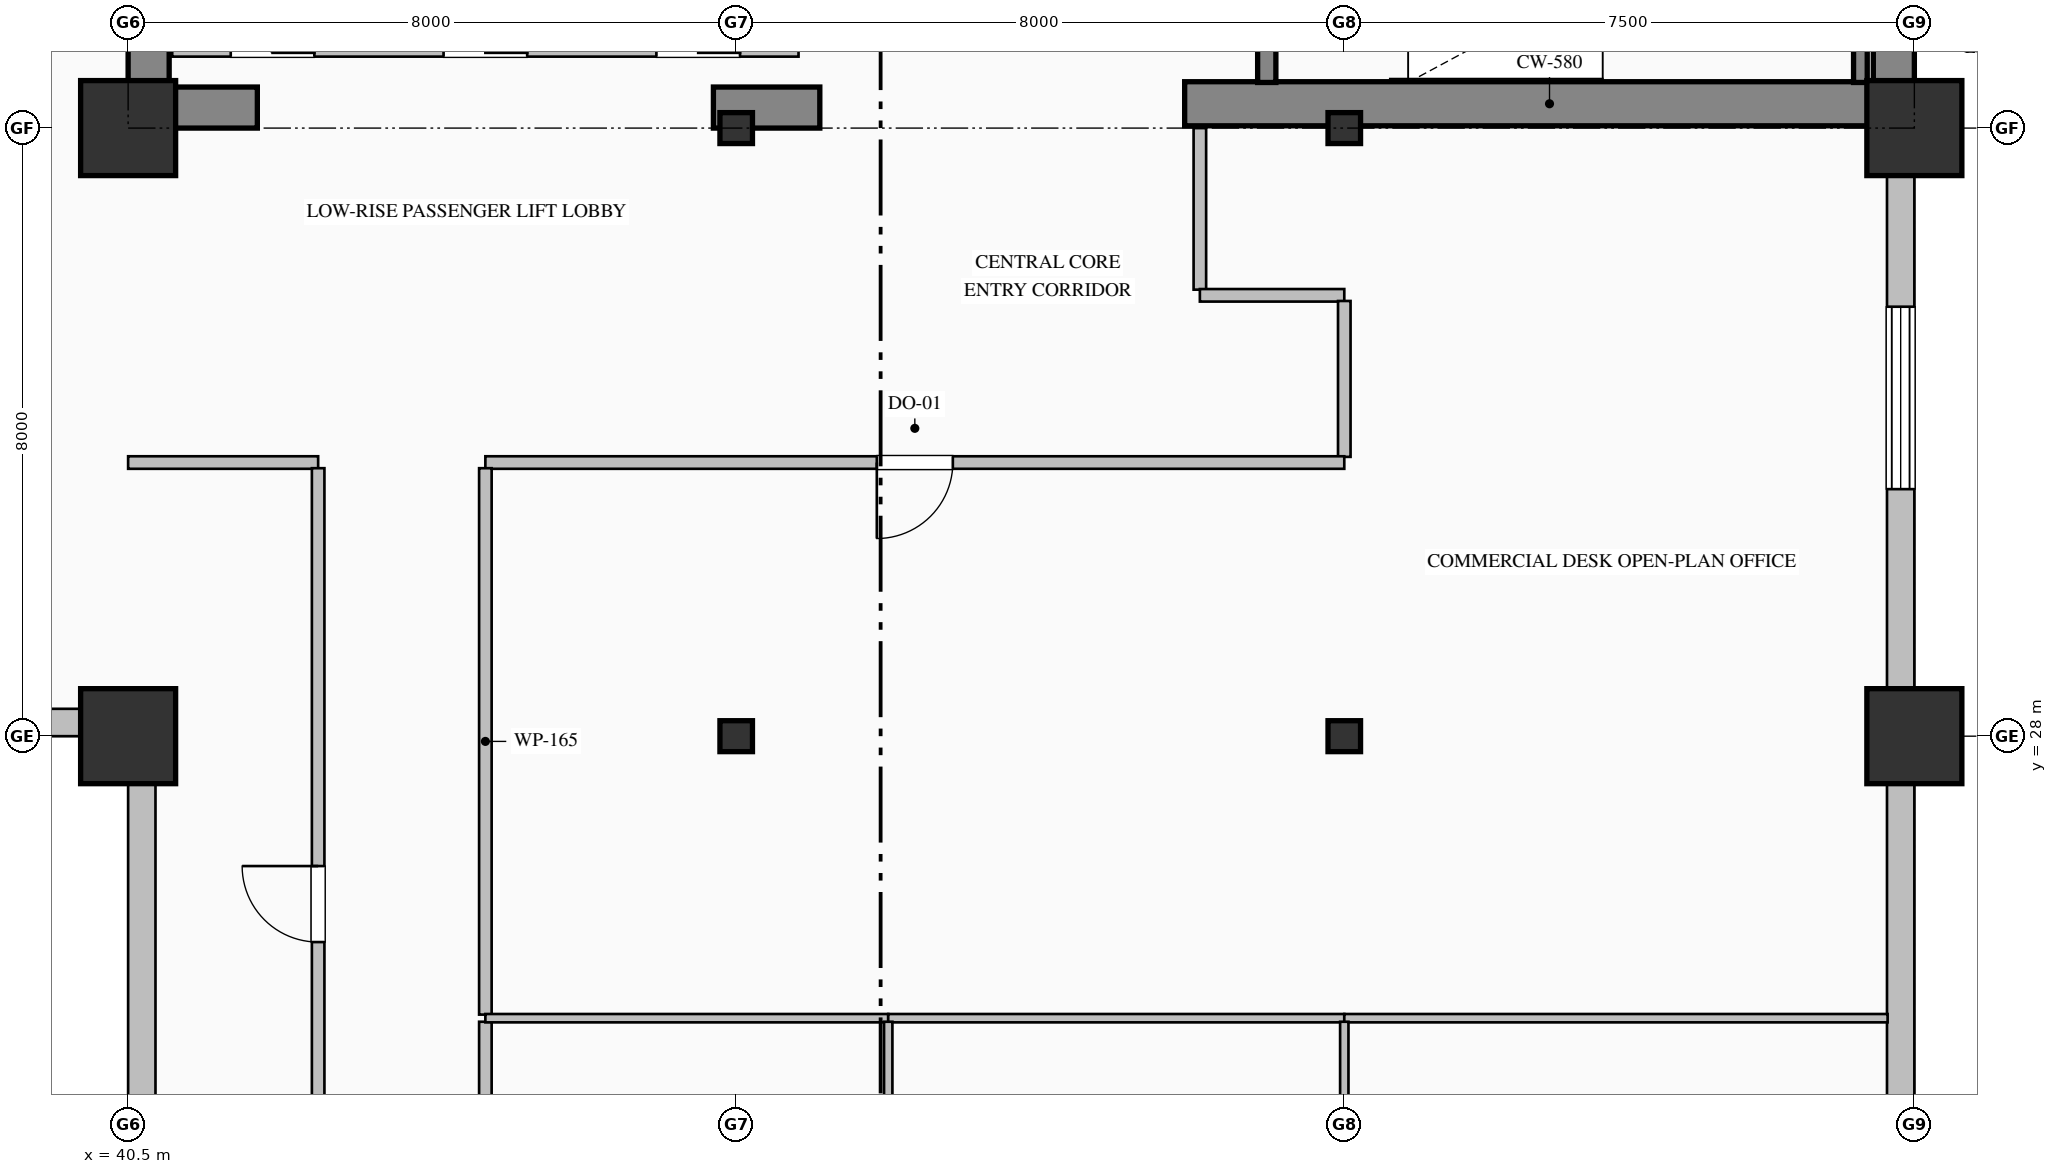
"""IFC4 building model, lengths in metres.
Left out: names, types, materials, properties, quantities, classifications, styles, units other than length and angle.
Written with IfcOpenShell. Run it as: python <this file> out.ifc"""

import sys

from ifc_helpers import new_model, si_unit, direction, frame, frame_2d, origin, origin_2d, place, context, subcontext, project, spatial, rectangle, hollow_rectangle, i_section, extrude, element, fill, save


model = new_model("IFC4")
c1 = context("Model", 3, precision=1e-05, world=origin(), true_north=direction((0.0, 1.0)))
c2 = subcontext(c1, "Body", "Model", "MODEL_VIEW")
j1 = project(units=[si_unit("LENGTHUNIT", "METRE"), si_unit("PLANEANGLEUNIT", "RADIAN")], contexts=[c1])
p1 = place(None, origin())
s1 = spatial("IfcSite", under=j1, at=p1, CompositionType="ELEMENT")
p2 = place(p1, origin())
s2 = spatial("IfcBuilding", under=s1, at=p2, CompositionType="ELEMENT")
p3 = place(p2, frame((0.0, 0.0, 96.2)))
s3 = spatial("IfcBuildingStorey", under=s2, at=p3, CompositionType="ELEMENT", Elevation=96.2)
p4 = place(p3, frame((63.73, 36.32, 0.0), z_axis=(0.0, 0.0, 1.0), x_axis=(0.0, 1.0, 0.0)))
e1 = element("IfcWall", 1, at=p4, inside=s3, PredefinedType="SHEAR", context=c2, shape_type="SweptSolid", body=[
    extrude(rectangle(XDim=15.14, YDim=0.54, at=frame_2d((7.57, 0.0))), origin(), (0.0, 0.0, 1.0), 3.75),
])
p5 = place(p3, frame((40.77, 36.54, 0.0), z_axis=(0.0, 0.0, 1.0), x_axis=(0.0, 1.0, 0.0)))
e2 = element("IfcWall", 2, at=p5, inside=s3, PredefinedType="SHEAR", context=c2, shape_type="SweptSolid", body=[
    extrude(rectangle(XDim=7.86, YDim=0.54, at=frame_2d((3.93, 0.0))), origin(), (0.0, 0.0, 1.0), 3.75),
])
p6 = place(p3, frame((40.5, 36.27, 0.0), z_axis=(0.0, 0.0, 1.0), x_axis=(1.0, 0.0, 0.0)))
e3 = element("IfcWall", 3, at=p6, inside=s3, PredefinedType="SHEAR", context=c2, shape_type="SweptSolid", body=[
    extrude(rectangle(XDim=1.7, YDim=0.54, at=frame_2d((0.85, 0.0))), origin(), (0.0, 0.0, 1.0), 3.75),
])
p7 = place(p3, frame((48.2, 36.27, 0.0), z_axis=(0.0, 0.0, 1.0), x_axis=(1.0, 0.0, 0.0)))
e4 = element("IfcWall", 4, at=p7, inside=s3, PredefinedType="SHEAR", context=c2, shape_type="SweptSolid", body=[
    extrude(rectangle(XDim=1.4, YDim=0.54, at=frame_2d((0.7, 0.0))), origin(), (0.0, 0.0, 1.0), 3.75),
])
p8 = place(p3, frame((54.4, 36.32, 0.0), z_axis=(0.0, 0.0, 1.0), x_axis=(1.0, 0.0, 0.0)))
e5 = element("IfcWall", 5, at=p8, inside=s3, PredefinedType="SHEAR", context=c2, shape_type="SweptSolid", body=[
    extrude(rectangle(XDim=9.6, YDim=0.58, at=frame_2d((4.8, 0.0))), origin(), (0.0, 0.0, 1.0), 4.0),
])
for number, where, z_axis, x_axis in (
    (6, (40.5, 28.0, 0.0), (0.0, 0.0, 1.0), (1.0, 0.0, 0.0)),
    (7, (40.5, 36.0, 0.0), (0.0, 0.0, 1.0), (1.0, 0.0, 0.0)),
):
    element("IfcColumn", number, at=place(p3, frame(where, z_axis=z_axis, x_axis=x_axis)), inside=s3, PredefinedType="COLUMN", context=c2, shape_type="SweptSolid", body=[
        extrude(hollow_rectangle(XDim=1.25, YDim=1.25, WallThickness=0.045, at=origin_2d()), origin(), (0.0, 0.0, 1.0), 4.0),
    ])
for number, where, z_axis, x_axis in (
    (8, (48.5, 28.0, 0.0), (0.0, 0.0, 1.0), (1.0, 0.0, 0.0)),
    (9, (48.5, 36.0, 0.0), (0.0, 0.0, 1.0), (1.0, 0.0, 0.0)),
    (10, (56.5, 28.0, 0.0), (0.0, 0.0, 1.0), (1.0, 0.0, 0.0)),
    (11, (56.5, 36.0, 0.0), (0.0, 0.0, 1.0), (1.0, 0.0, 0.0)),
):
    element("IfcColumn", number, at=place(p3, frame(where, z_axis=z_axis, x_axis=x_axis)), inside=s3, PredefinedType="COLUMN", context=c2, shape_type="SweptSolid", body=[
        extrude(i_section(OverallWidth=0.407, OverallDepth=0.428, WebThickness=0.02, FlangeThickness=0.035, FilletRadius=0.022, at=origin_2d()), origin(), (0.0, 0.0, 1.0), 4.0),
    ])
for number, where, z_axis, x_axis in (
    (12, (64.0, 28.0, 0.0), (0.0, 0.0, 1.0), (1.0, 0.0, 0.0)),
    (13, (64.0, 36.0, 0.0), (0.0, 0.0, 1.0), (1.0, 0.0, 0.0)),
):
    element("IfcColumn", number, at=place(p3, frame(where, z_axis=z_axis, x_axis=x_axis)), inside=s3, PredefinedType="COLUMN", context=c2, shape_type="SweptSolid", body=[
        extrude(hollow_rectangle(XDim=1.25, YDim=1.25, WallThickness=0.045, at=origin_2d()), origin(), (0.0, 0.0, 1.0), 4.0),
    ])
p9 = place(p3, frame((40.68, 8.0, 0.0), z_axis=(0.0, 0.0, 1.0), x_axis=(0.0, 1.0, 0.0)))
e14 = element("IfcWall", 14, at=p9, inside=s3, PredefinedType="SOLIDWALL", context=c2, shape_type="SweptSolid", body=[
    extrude(rectangle(XDim=20.36, YDim=0.36, at=frame_2d((10.18, 0.0))), origin(), (0.0, 0.0, 1.0), 3.05),
])
p10 = place(p9, frame((6.6, 0.0, 0.7)))
e15 = element("IfcOpeningElement", 15, at=p10, cuts=e14, PredefinedType="OPENING", context=c2, shape_type="SweptSolid", body=[
    extrude(rectangle(XDim=1.2, YDim=1.85, at=frame_2d((0.6, 0.925))), frame((0.0, 0.19, 0.0), z_axis=(0.0, -1.0, 0.0), x_axis=(1.0, 0.0, 0.0)), (0.0, 0.0, 1.0), 0.38),
])
p11 = place(p9, frame((13.8, 0.0, 0.7)))
e16 = element("IfcOpeningElement", 16, at=p11, cuts=e14, PredefinedType="OPENING", context=c2, shape_type="SweptSolid", body=[
    extrude(rectangle(XDim=1.2, YDim=1.85, at=frame_2d((0.6, 0.925))), frame((0.0, 0.19, 0.0), z_axis=(0.0, -1.0, 0.0), x_axis=(1.0, 0.0, 0.0)), (0.0, 0.0, 1.0), 0.38),
])
p12 = place(p3, frame((40.52, 28.18, 0.0), z_axis=(0.0, 0.0, 1.0), x_axis=(-1.0, 0.0, 0.0)))
e17 = element("IfcWall", 17, at=p12, inside=s3, PredefinedType="SOLIDWALL", context=c2, shape_type="SweptSolid", body=[
    extrude(rectangle(XDim=36.52, YDim=0.36, at=frame_2d((18.26, 0.0))), origin(), (0.0, 0.0, 1.0), 3.05),
])
p13 = place(p12, frame((13.8, 0.0, 0.7)))
e18 = element("IfcOpeningElement", 18, at=p13, cuts=e17, PredefinedType="OPENING", context=c2, shape_type="SweptSolid", body=[
    extrude(rectangle(XDim=1.2, YDim=1.85, at=frame_2d((0.6, 0.925))), frame((0.0, 0.19, 0.0), z_axis=(0.0, -1.0, 0.0), x_axis=(1.0, 0.0, 0.0)), (0.0, 0.0, 1.0), 0.38),
])
p14 = place(p12, frame((21.0, 0.0, 0.7)))
e19 = element("IfcOpeningElement", 19, at=p14, cuts=e17, PredefinedType="OPENING", context=c2, shape_type="SweptSolid", body=[
    extrude(rectangle(XDim=1.2, YDim=1.85, at=frame_2d((0.6, 0.925))), frame((0.0, 0.19, 0.0), z_axis=(0.0, -1.0, 0.0), x_axis=(1.0, 0.0, 0.0)), (0.0, 0.0, 1.0), 0.38),
])
p15 = place(p3, frame((63.82, 36.05, 0.0), z_axis=(0.0, 0.0, 1.0), x_axis=(0.0, -1.0, 0.0)))
e20 = element("IfcWall", 20, at=p15, inside=s3, PredefinedType="SOLIDWALL", context=c2, shape_type="SweptSolid", body=[
    extrude(rectangle(XDim=28.05, YDim=0.36, at=frame_2d((14.025, 0.0))), origin(), (0.0, 0.0, 1.0), 3.25),
])
p16 = place(p15, frame((2.4, 0.0, 0.8)))
e21 = element("IfcOpeningElement", 21, at=p16, cuts=e20, PredefinedType="OPENING", context=c2, shape_type="SweptSolid", body=[
    extrude(rectangle(XDim=2.4, YDim=2.15, at=frame_2d((1.2, 1.075))), frame((0.0, 0.19, 0.0), z_axis=(0.0, -1.0, 0.0), x_axis=(1.0, 0.0, 0.0)), (0.0, 0.0, 1.0), 0.38),
])
p17 = place(p15, frame((13.2, 0.0, 0.8)))
e22 = element("IfcOpeningElement", 22, at=p17, cuts=e20, PredefinedType="OPENING", context=c2, shape_type="SweptSolid", body=[
    extrude(rectangle(XDim=2.4, YDim=2.15, at=frame_2d((1.2, 1.075))), frame((0.0, 0.19, 0.0), z_axis=(0.0, -1.0, 0.0), x_axis=(1.0, 0.0, 0.0)), (0.0, 0.0, 1.0), 0.38),
])
p18 = place(p3, frame((55.48, 39.75, 0.0), z_axis=(0.0, 0.0, 1.0), x_axis=(0.0, -1.0, 0.0)))
e23 = element("IfcWall", 23, at=p18, inside=s3, PredefinedType="SOLIDWALL", context=c2, shape_type="SweptSolid", body=[
    extrude(rectangle(XDim=3.15, YDim=0.24, at=frame_2d((1.575, 0.0))), origin(), (0.0, 0.0, 1.0), 4.0),
])
p19 = place(p18, frame((1.0, 0.0, 0.0)))
e24 = element("IfcOpeningElement", 24, at=p19, cuts=e23, PredefinedType="OPENING", context=c2, shape_type="SweptSolid", body=[
    extrude(rectangle(XDim=1.15, YDim=2.2, at=frame_2d((0.575, 1.1))), frame((0.0, 0.13, 0.0), z_axis=(0.0, -1.0, 0.0), x_axis=(1.0, 0.0, 0.0)), (0.0, 0.0, 1.0), 0.26),
])
p20 = place(p3, frame((63.29, 36.6, 0.0), z_axis=(0.0, 0.0, 1.0), x_axis=(0.0, 1.0, 0.0)))
e25 = element("IfcWall", 25, at=p20, inside=s3, PredefinedType="SOLIDWALL", context=c2, shape_type="SweptSolid", body=[
    extrude(rectangle(XDim=3.15, YDim=0.18, at=frame_2d((1.575, 0.0))), origin(), (0.0, 0.0, 1.0), 4.0),
])
p21 = place(p3, frame((49.32, 37.05, 0.0), z_axis=(0.0, 0.0, 1.0), x_axis=(-1.0, 0.0, 0.0)))
e26 = element("IfcWall", 26, at=p21, inside=s3, PredefinedType="PARTITIONING", context=c2, shape_type="SweptSolid", body=[
    extrude(rectangle(XDim=8.24, YDim=0.22, at=frame_2d((4.12, 0.0))), origin(), (0.0, 0.0, 1.0), 3.75),
])
p22 = place(p21, frame((6.37, 0.0, 0.0)))
e27 = element("IfcOpeningElement", 27, at=p22, cuts=e26, PredefinedType="OPENING", context=c2, shape_type="SweptSolid", body=[
    extrude(rectangle(XDim=1.1, YDim=2.2, at=frame_2d((0.55, 1.1))), frame((0.0, 0.12, 0.0), z_axis=(0.0, -1.0, 0.0), x_axis=(1.0, 0.0, 0.0)), (0.0, 0.0, 1.0), 0.24),
])
p23 = place(p21, frame((3.57, 0.0, 0.0)))
e28 = element("IfcOpeningElement", 28, at=p23, cuts=e26, PredefinedType="OPENING", context=c2, shape_type="SweptSolid", body=[
    extrude(rectangle(XDim=1.1, YDim=2.2, at=frame_2d((0.55, 1.1))), frame((0.0, 0.12, 0.0), z_axis=(0.0, -1.0, 0.0), x_axis=(1.0, 0.0, 0.0)), (0.0, 0.0, 1.0), 0.24),
])
p24 = place(p21, frame((0.77, 0.0, 0.0)))
e29 = element("IfcOpeningElement", 29, at=p24, cuts=e26, PredefinedType="OPENING", context=c2, shape_type="SweptSolid", body=[
    extrude(rectangle(XDim=1.1, YDim=2.2, at=frame_2d((0.55, 1.1))), frame((0.0, 0.12, 0.0), z_axis=(0.0, -1.0, 0.0), x_axis=(1.0, 0.0, 0.0)), (0.0, 0.0, 1.0), 0.24),
])
p25 = place(p3, frame((54.6, 36.0, 0.0), z_axis=(0.0, 0.0, 1.0), x_axis=(0.0, -1.0, 0.0)))
e30 = element("IfcWall", 30, at=p25, inside=s3, PredefinedType="PARTITIONING", context=c2, shape_type="SweptSolid", body=[
    extrude(rectangle(XDim=2.125, YDim=0.165, at=frame_2d((1.063, 0.0))), origin(), (0.0, 0.0, 1.0), 3.75),
])
p26 = place(p3, frame((54.6, 33.8, 0.0), z_axis=(0.0, 0.0, 1.0), x_axis=(1.0, 0.0, 0.0)))
e31 = element("IfcWall", 31, at=p26, inside=s3, PredefinedType="PARTITIONING", context=c2, shape_type="SweptSolid", body=[
    extrude(rectangle(XDim=1.9, YDim=0.165, at=frame_2d((0.95, 0.0))), origin(), (0.0, 0.0, 1.0), 3.75),
])
p27 = place(p3, frame((56.5, 33.726, 0.0), z_axis=(0.0, 0.0, 1.0), x_axis=(0.0, -1.0, 0.0)))
e32 = element("IfcWall", 32, at=p27, inside=s3, PredefinedType="PARTITIONING", context=c2, shape_type="SweptSolid", body=[
    extrude(rectangle(XDim=2.051, YDim=0.165, at=frame_2d((1.025, 0.0))), origin(), (0.0, 0.0, 1.0), 3.042),
])
p28 = place(p3, frame((56.5, 31.6, 0.0), z_axis=(0.0, 0.0, 1.0), x_axis=(-1.0, 0.0, 0.0)))
e33 = element("IfcWall", 33, at=p28, inside=s3, PredefinedType="PARTITIONING", context=c2, shape_type="SweptSolid", body=[
    extrude(rectangle(XDim=11.3, YDim=0.165, at=frame_2d((5.65, 0.0))), origin(), (0.0, 0.0, 1.0), 3.75),
])
p29 = place(p28, frame((5.15, 0.0, 0.0)))
e34 = element("IfcOpeningElement", 34, at=p29, cuts=e33, PredefinedType="OPENING", context=c2, shape_type="SweptSolid", body=[
    extrude(rectangle(XDim=1.0, YDim=2.15, at=frame_2d((0.5, 1.075))), frame((0.0, 0.093, 0.0), z_axis=(0.0, -1.0, 0.0), x_axis=(1.0, 0.0, 0.0)), (0.0, 0.0, 1.0), 0.185),
])
p30 = place(p3, frame((43.0, 31.6, 0.0), z_axis=(0.0, 0.0, 1.0), x_axis=(-1.0, 0.0, 0.0)))
e35 = element("IfcWall", 35, at=p30, inside=s3, PredefinedType="PARTITIONING", context=c2, shape_type="SweptSolid", body=[
    extrude(rectangle(XDim=2.5, YDim=0.165, at=frame_2d((1.25, 0.0))), origin(), (0.0, 0.0, 1.0), 3.75),
])
p31 = place(p3, frame((45.2, 31.525, 0.0), z_axis=(0.0, 0.0, 1.0), x_axis=(0.0, -1.0, 0.0)))
e36 = element("IfcWall", 36, at=p31, inside=s3, PredefinedType="PARTITIONING", context=c2, shape_type="SweptSolid", body=[
    extrude(rectangle(XDim=7.188, YDim=0.165, at=frame_2d((3.594, 0.0))), origin(), (0.0, 0.0, 1.0), 3.75),
])
p32 = place(p3, frame((45.2, 24.243, 0.0), z_axis=(0.0, 0.0, 1.0), x_axis=(0.0, -1.0, 0.0)))
e37 = element("IfcWall", 37, at=p32, inside=s3, PredefinedType="PARTITIONING", context=c2, shape_type="SweptSolid", body=[
    extrude(rectangle(XDim=9.469, YDim=0.165, at=frame_2d((4.734, 0.0))), origin(), (0.0, 0.0, 1.0), 3.75),
])
p33 = place(p32, frame((4.234, 0.0, 0.0)))
e38 = element("IfcOpeningElement", 38, at=p33, cuts=e37, PredefinedType="OPENING", context=c2, shape_type="SweptSolid", body=[
    extrude(rectangle(XDim=1.0, YDim=2.15, at=frame_2d((0.5, 1.075))), frame((0.0, 0.093, 0.0), z_axis=(0.0, -1.0, 0.0), x_axis=(1.0, 0.0, 0.0)), (0.0, 0.0, 1.0), 0.185),
])
p34 = place(p3, frame((43.0, 20.057, 0.0), z_axis=(0.0, 0.0, 1.0), x_axis=(0.0, 1.0, 0.0)))
e39 = element("IfcWall", 39, at=p34, inside=s3, PredefinedType="PARTITIONING", context=c2, shape_type="SweptSolid", body=[
    extrude(rectangle(XDim=11.469, YDim=0.165, at=frame_2d((5.734, 0.0))), origin(), (0.0, 0.0, 1.0), 3.75),
])
p35 = place(p34, frame((5.234, 0.0, 0.0)))
e40 = element("IfcOpeningElement", 40, at=p35, cuts=e39, PredefinedType="OPENING", context=c2, shape_type="SweptSolid", body=[
    extrude(rectangle(XDim=1.0, YDim=2.15, at=frame_2d((0.5, 1.075))), frame((0.0, 0.093, 0.0), z_axis=(0.0, -1.0, 0.0), x_axis=(1.0, 0.0, 0.0)), (0.0, 0.0, 1.0), 0.185),
])
p36 = place(p3, frame((50.5, 24.29, 0.0), z_axis=(0.0, 0.0, 1.0), x_axis=(-1.0, 0.0, 0.0)))
e41 = element("IfcWall", 41, at=p36, inside=s3, PredefinedType="MOVABLE", context=c2, shape_type="SweptSolid", body=[
    extrude(rectangle(XDim=5.3, YDim=0.11, at=frame_2d((2.65, 0.0))), origin(), (0.0, 0.0, 1.0), 3.75),
])
p37 = place(p3, frame((56.5, 24.29, 0.0), z_axis=(0.0, 0.0, 1.0), x_axis=(-1.0, 0.0, 0.0)))
e42 = element("IfcWall", 42, at=p37, inside=s3, PredefinedType="MOVABLE", context=c2, shape_type="SweptSolid", body=[
    extrude(rectangle(XDim=6.0, YDim=0.11, at=frame_2d((3.0, 0.0))), origin(), (0.0, 0.0, 1.0), 3.75),
])
p38 = place(p3, frame((63.648, 24.29, 0.0), z_axis=(0.0, 0.0, 1.0), x_axis=(-1.0, 0.0, 0.0)))
e43 = element("IfcWall", 43, at=p38, inside=s3, PredefinedType="MOVABLE", context=c2, shape_type="SweptSolid", body=[
    extrude(rectangle(XDim=7.148, YDim=0.11, at=frame_2d((3.574, 0.0))), origin(), (0.0, 0.0, 1.0), 3.75),
])
p39 = place(p3, frame((50.5, 24.243, 0.0), z_axis=(0.0, 0.0, 1.0), x_axis=(0.0, -1.0, 0.0)))
e44 = element("IfcWall", 44, at=p39, inside=s3, PredefinedType="MOVABLE", context=c2, shape_type="SweptSolid", body=[
    extrude(rectangle(XDim=9.469, YDim=0.11, at=frame_2d((4.734, 0.0))), origin(), (0.0, 0.0, 1.0), 3.75),
])
p40 = place(p3, frame((56.5, 24.243, 0.0), z_axis=(0.0, 0.0, 1.0), x_axis=(0.0, -1.0, 0.0)))
e45 = element("IfcWall", 45, at=p40, inside=s3, PredefinedType="MOVABLE", context=c2, shape_type="SweptSolid", body=[
    extrude(rectangle(XDim=9.469, YDim=0.11, at=frame_2d((4.734, 0.0))), origin(), (0.0, 0.0, 1.0), 2.942),
])
p41 = place(p16, origin())
e46 = element("IfcWindow", 46, at=p41, inside=s3, PartitioningType="TRIPLE_PANEL_VERTICAL", PredefinedType="WINDOW", context=c2, shape_type="SweptSolid", body=[
    extrude(rectangle(XDim=2.4, YDim=2.15, at=frame_2d((1.2, 1.075))), frame((0.0, 0.15, 0.0), z_axis=(0.0, -1.0, 0.0), x_axis=(1.0, 0.0, 0.0)), (0.0, 0.0, 1.0), 0.06),
])
fill(e21, e46)
p42 = place(p29, origin())
e47 = element("IfcDoor", 47, at=p42, inside=s3, OperationType="SINGLE_SWING_RIGHT", PredefinedType="DOOR", context=c2, shape_type="SweptSolid", body=[
    extrude(rectangle(XDim=1.0, YDim=2.15, at=frame_2d((0.5, 1.075))), frame((0.0, 0.025, 0.0), z_axis=(0.0, -1.0, 0.0), x_axis=(1.0, 0.0, 0.0)), (0.0, 0.0, 1.0), 0.05),
])
fill(e34, e47)
p43 = place(p35, origin())
e48 = element("IfcDoor", 48, at=p43, inside=s3, OperationType="SINGLE_SWING_RIGHT", PredefinedType="DOOR", context=c2, shape_type="SweptSolid", body=[
    extrude(rectangle(XDim=1.0, YDim=2.15, at=frame_2d((0.5, 1.075))), frame((0.0, 0.025, 0.0), z_axis=(0.0, -1.0, 0.0), x_axis=(1.0, 0.0, 0.0)), (0.0, 0.0, 1.0), 0.05),
])
fill(e40, e48)
save(model, sys.argv[1])
